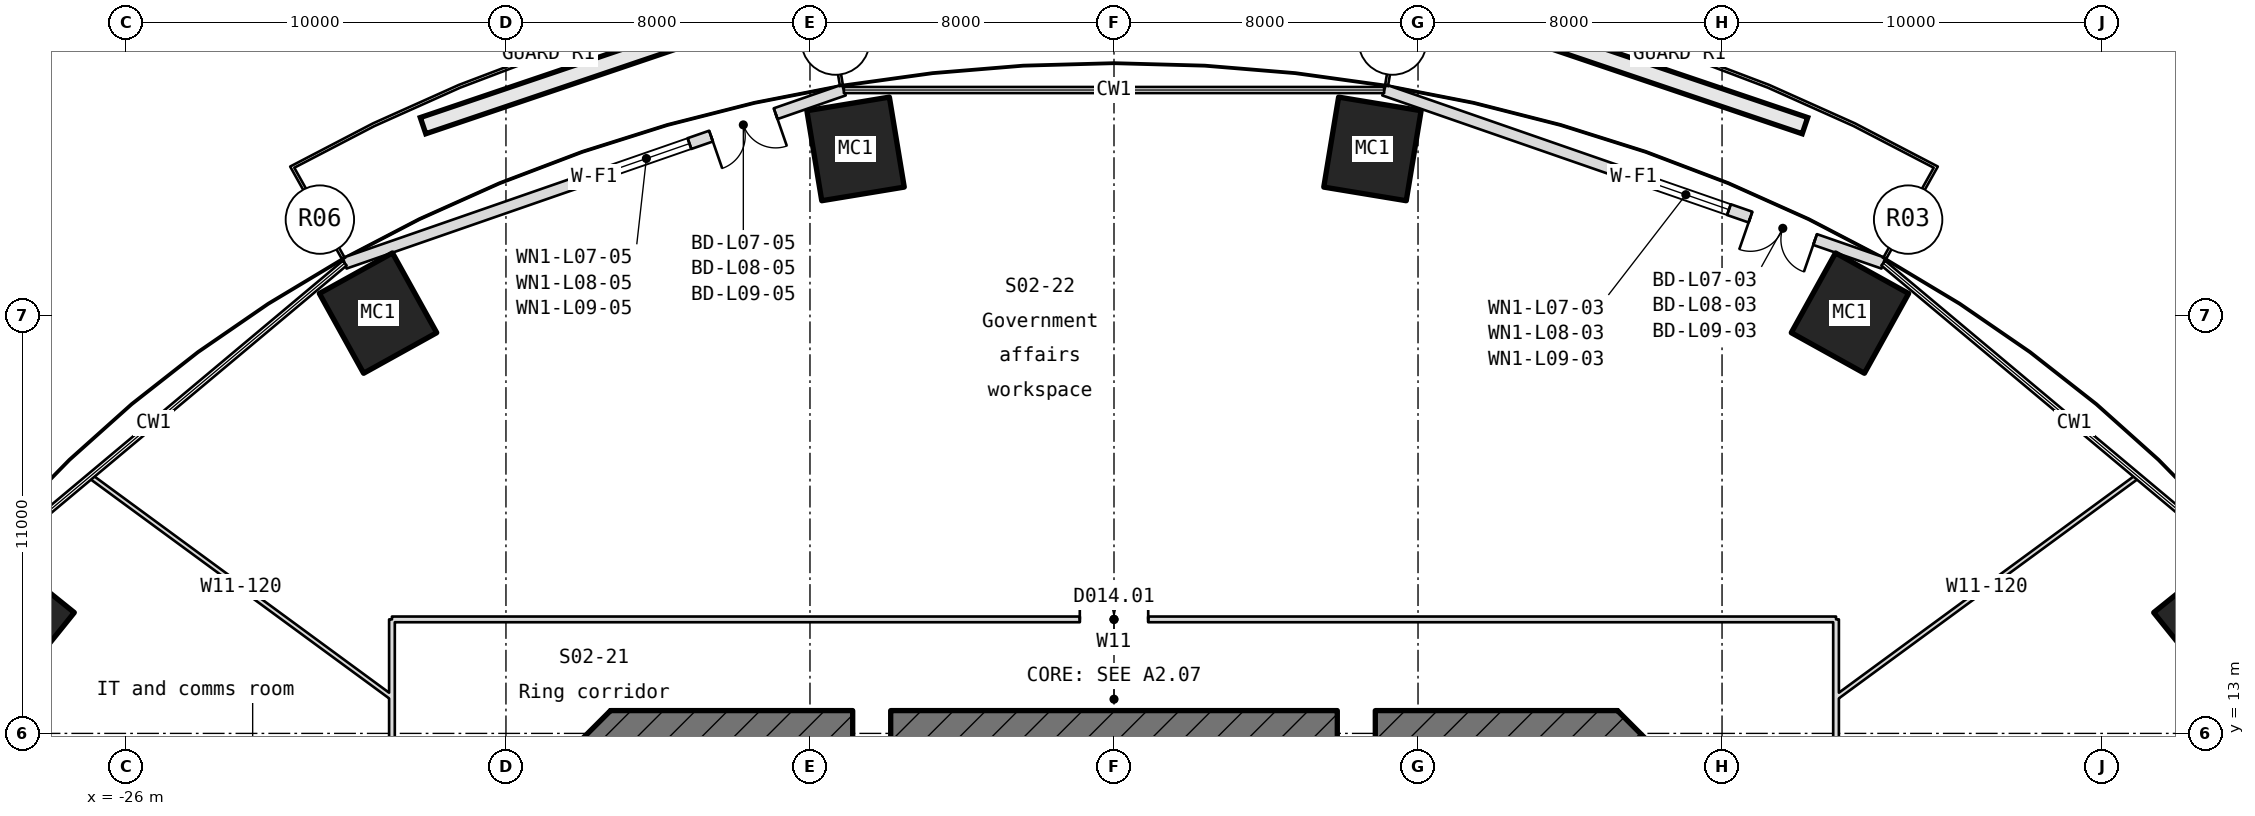
"""IFC4 building model, lengths in metres.
Left out: names, types, materials, properties, quantities, classifications, styles, units other than length and angle.
Written with IfcOpenShell. Run it as: python <this file> out.ifc"""

import sys

from ifc_helpers import new_model, si_unit, direction, frame, frame_2d, origin, origin_2d, place, context, subcontext, project, spatial, rectangle, hollow_rectangle, extrude, element, fill, save


model = new_model("IFC4")
c1 = context("Model", 3, precision=1e-05, world=origin(), true_north=direction((0.0, 1.0)))
c2 = subcontext(c1, "Body", "Model", "MODEL_VIEW")
j1 = project(units=[si_unit("LENGTHUNIT", "METRE"), si_unit("PLANEANGLEUNIT", "RADIAN")], contexts=[c1])
p1 = place(None, origin())
s1 = spatial("IfcSite", under=j1, at=p1, CompositionType="ELEMENT")
p2 = place(p1, origin())
s2 = spatial("IfcBuilding", under=s1, at=p2, CompositionType="ELEMENT")
p3 = place(p2, frame((0.0, 0.0, 45.45)))
s3 = spatial("IfcBuildingStorey", under=s2, at=p3, CompositionType="ELEMENT", Elevation=45.45)
for number, where, z_axis, x_axis in (
    (1, (28.983, 16.075, -0.18), (0.0, 0.0, 1.0), (0.627, -0.779, 0.0)),
    (2, (19.366, 24.059, -0.18), (0.0, 0.0, 1.0), (0.874, -0.485, 0.0)),
    (3, (6.801, 28.379, -0.18), (0.0, 0.0, 1.0), (0.987, -0.163, 0.0)),
    (4, (-6.801, 28.379, -0.18), (0.0, 0.0, 1.0), (0.987, 0.163, 0.0)),
    (5, (-19.366, 24.059, -0.18), (0.0, 0.0, 1.0), (0.874, 0.485, 0.0)),
    (6, (-28.983, 16.075, -0.18), (0.0, 0.0, 1.0), (0.627, 0.779, 0.0)),
):
    element("IfcColumn", number, at=place(p3, frame(where, z_axis=z_axis, x_axis=x_axis)), inside=s3, PredefinedType="COLUMN", context=c2, shape_type="SweptSolid", body=[
        extrude(hollow_rectangle(XDim=2.2, YDim=2.4, WallThickness=0.09, at=origin_2d()), origin(), (0.0, 0.0, 1.0), 4.15),
    ])
p4 = place(p3, frame((20.244, 25.372, 0.0), z_axis=(0.0, 0.0, 1.0), x_axis=(-0.944772924092, 0.327725680873, 0.0)))
e7 = element("IfcWall", 7, at=p4, inside=s3, PredefinedType="SOLIDWALL", context=c2, shape_type="SweptSolid", body=[
    extrude(rectangle(XDim=13.903, YDim=0.3, at=frame_2d((6.952, 0.0))), origin(), (0.0, 0.0, 1.0), 3.97),
])
p5 = place(p4, frame((1.9, 0.0, 0.0)))
e8 = element("IfcOpeningElement", 8, at=p5, cuts=e7, PredefinedType="OPENING", context=c2, shape_type="SweptSolid", body=[
    extrude(rectangle(XDim=1.8, YDim=2.4, at=frame_2d((0.9, 1.2))), frame((0.0, 0.16, 0.0), z_axis=(0.0, -1.0, 0.0), x_axis=(1.0, 0.0, 0.0)), (0.0, 0.0, 1.0), 0.32),
])
p6 = place(p4, frame((4.3, 0.0, 0.9)))
e9 = element("IfcOpeningElement", 9, at=p6, cuts=e7, PredefinedType="OPENING", context=c2, shape_type="SweptSolid", body=[
    extrude(rectangle(XDim=2.4, YDim=1.5, at=frame_2d((1.2, 0.75))), frame((0.0, 0.16, 0.0), z_axis=(0.0, -1.0, 0.0), x_axis=(1.0, 0.0, 0.0)), (0.0, 0.0, 1.0), 0.32),
])
p7 = place(p3, frame((-7.109, 29.929, 0.0), z_axis=(0.0, 0.0, 1.0), x_axis=(-0.944772924092, -0.327725680873, 0.0)))
e10 = element("IfcWall", 10, at=p7, inside=s3, PredefinedType="SOLIDWALL", context=c2, shape_type="SweptSolid", body=[
    extrude(rectangle(XDim=13.903, YDim=0.3, at=frame_2d((6.952, 0.0))), origin(), (0.0, 0.0, 1.0), 3.97),
])
p8 = place(p7, frame((1.9, 0.0, 0.0)))
e11 = element("IfcOpeningElement", 11, at=p8, cuts=e10, PredefinedType="OPENING", context=c2, shape_type="SweptSolid", body=[
    extrude(rectangle(XDim=1.8, YDim=2.4, at=frame_2d((0.9, 1.2))), frame((0.0, 0.16, 0.0), z_axis=(0.0, -1.0, 0.0), x_axis=(1.0, 0.0, 0.0)), (0.0, 0.0, 1.0), 0.32),
])
p9 = place(p7, frame((4.3, 0.0, 0.9)))
e12 = element("IfcOpeningElement", 12, at=p9, cuts=e10, PredefinedType="OPENING", context=c2, shape_type="SweptSolid", body=[
    extrude(rectangle(XDim=2.4, YDim=1.5, at=frame_2d((1.2, 0.75))), frame((0.0, 0.16, 0.0), z_axis=(0.0, -1.0, 0.0), x_axis=(1.0, 0.0, 0.0)), (0.0, 0.0, 1.0), 0.32),
])
p10 = place(p3, frame((16.176, 9.824, -0.18), z_axis=(0.0, 0.0, 1.0), x_axis=(-0.707106781187, 0.707106781187, 0.0)))
e13 = element("IfcWall", 13, at=p10, inside=s3, PredefinedType="SHEAR", context=c2, shape_type="SweptSolid", body=[
    extrude(rectangle(XDim=4.74, YDim=1.2, at=frame_2d((2.37, 0.0))), origin(), (0.0, 0.0, 1.0), 4.15),
])
p11 = place(p3, frame((13.249, 13.0, -0.18), z_axis=(0.0, 0.0, 1.0), x_axis=(-1.0, 0.0, 0.0)))
e14 = element("IfcWall", 14, at=p11, inside=s3, PredefinedType="SHEAR", context=c2, shape_type="SweptSolid", body=[
    extrude(rectangle(XDim=26.497, YDim=1.2, at=frame_2d((13.249, 0.0))), origin(), (0.0, 0.0, 1.0), 4.15),
])
p12 = place(p11, frame((19.125, 0.0, 0.18)))
e15 = element("IfcOpeningElement", 15, at=p12, cuts=e14, PredefinedType="OPENING", context=c2, shape_type="SweptSolid", body=[
    extrude(rectangle(XDim=1.0, YDim=2.1, at=frame_2d((0.5, 1.05))), frame((0.0, 0.61, 0.0), z_axis=(0.0, -1.0, 0.0), x_axis=(1.0, 0.0, 0.0)), (0.0, 0.0, 1.0), 1.22),
])
p13 = place(p11, frame((6.373, 0.0, 0.18)))
e16 = element("IfcOpeningElement", 16, at=p13, cuts=e14, PredefinedType="OPENING", context=c2, shape_type="SweptSolid", body=[
    extrude(rectangle(XDim=1.0, YDim=2.1, at=frame_2d((0.5, 1.05))), frame((0.0, 0.61, 0.0), z_axis=(0.0, -1.0, 0.0), x_axis=(1.0, 0.0, 0.0)), (0.0, 0.0, 1.0), 1.22),
])
p14 = place(p3, frame((-12.824, 13.176, -0.18), z_axis=(0.0, 0.0, 1.0), x_axis=(-0.707106781187, -0.707106781187, 0.0)))
e17 = element("IfcWall", 17, at=p14, inside=s3, PredefinedType="SHEAR", context=c2, shape_type="SweptSolid", body=[
    extrude(rectangle(XDim=4.74, YDim=1.2, at=frame_2d((2.37, 0.0))), origin(), (0.0, 0.0, 1.0), 4.15),
])
p15 = place(p3, frame((-19.0, -16.0, 0.0), z_axis=(0.0, 0.0, 1.0), x_axis=(0.0, 1.0, 0.0)))
e18 = element("IfcWall", 18, at=p15, inside=s3, PredefinedType="PARTITIONING", context=c2, shape_type="SweptSolid", body=[
    extrude(rectangle(XDim=32.0, YDim=0.15, at=frame_2d((16.0, 0.0))), origin(), (0.0, 0.0, 1.0), 3.97),
])
p16 = place(p15, frame((23.947, 0.0, 0.0)))
e19 = element("IfcOpeningElement", 19, at=p16, cuts=e18, PredefinedType="OPENING", context=c2, shape_type="SweptSolid", body=[
    extrude(rectangle(XDim=0.95, YDim=2.1, at=frame_2d((0.475, 1.05))), frame((0.0, 0.085, 0.0), z_axis=(0.0, -1.0, 0.0), x_axis=(1.0, 0.0, 0.0)), (0.0, 0.0, 1.0), 0.17),
])
p17 = place(p15, frame((19.771, 0.0, 0.0)))
e20 = element("IfcOpeningElement", 20, at=p17, cuts=e18, PredefinedType="OPENING", context=c2, shape_type="SweptSolid", body=[
    extrude(rectangle(XDim=0.95, YDim=2.1, at=frame_2d((0.475, 1.05))), frame((0.0, 0.085, 0.0), z_axis=(0.0, -1.0, 0.0), x_axis=(1.0, 0.0, 0.0)), (0.0, 0.0, 1.0), 0.17),
])
p18 = place(p15, frame((15.804, 0.0, 0.0)))
e21 = element("IfcOpeningElement", 21, at=p18, cuts=e18, PredefinedType="OPENING", context=c2, shape_type="SweptSolid", body=[
    extrude(rectangle(XDim=0.95, YDim=2.1, at=frame_2d((0.475, 1.05))), frame((0.0, 0.085, 0.0), z_axis=(0.0, -1.0, 0.0), x_axis=(1.0, 0.0, 0.0)), (0.0, 0.0, 1.0), 0.17),
])
p19 = place(p15, frame((12.03, 0.0, 0.0)))
e22 = element("IfcOpeningElement", 22, at=p19, cuts=e18, PredefinedType="OPENING", context=c2, shape_type="SweptSolid", body=[
    extrude(rectangle(XDim=0.95, YDim=2.1, at=frame_2d((0.475, 1.05))), frame((0.0, 0.085, 0.0), z_axis=(0.0, -1.0, 0.0), x_axis=(1.0, 0.0, 0.0)), (0.0, 0.0, 1.0), 0.17),
])
p20 = place(p3, frame((-19.0, 13.941, 0.0), z_axis=(0.0, 0.0, 1.0), x_axis=(-0.806231534746, 0.591600128787, 0.0)))
e23 = element("IfcWall", 23, at=p20, inside=s3, PredefinedType="PARTITIONING", context=c2, shape_type="SweptSolid", body=[
    extrude(rectangle(XDim=9.846, YDim=0.12, at=frame_2d((4.923, 0.0))), origin(), (0.0, 0.0, 1.0), 3.97),
])
p21 = place(p3, frame((-19.0, 16.0, 0.0), z_axis=(0.0, 0.0, 1.0), x_axis=(1.0, 0.0, 0.0)))
e24 = element("IfcWall", 24, at=p21, inside=s3, PredefinedType="PARTITIONING", context=c2, shape_type="SweptSolid", body=[
    extrude(rectangle(XDim=38.0, YDim=0.15, at=frame_2d((19.0, 0.0))), origin(), (0.0, 0.0, 1.0), 3.97),
])
p22 = place(p21, frame((18.1, 0.0, 0.0)))
e25 = element("IfcOpeningElement", 25, at=p22, cuts=e24, PredefinedType="OPENING", context=c2, shape_type="SweptSolid", body=[
    extrude(rectangle(XDim=1.8, YDim=2.1, at=frame_2d((0.9, 1.05))), frame((0.0, 0.085, 0.0), z_axis=(0.0, -1.0, 0.0), x_axis=(1.0, 0.0, 0.0)), (0.0, 0.0, 1.0), 0.17),
])
p23 = place(p3, frame((19.0, 13.941, 0.0), z_axis=(0.0, 0.0, 1.0), x_axis=(0.806243361472, 0.59158401101, 0.0)))
e26 = element("IfcWall", 26, at=p23, inside=s3, PredefinedType="PARTITIONING", context=c2, shape_type="SweptSolid", body=[
    extrude(rectangle(XDim=9.846, YDim=0.12, at=frame_2d((4.923, 0.0))), origin(), (0.0, 0.0, 1.0), 3.97),
])
p24 = place(p3, frame((19.0, 16.0, 0.0), z_axis=(0.0, 0.0, 1.0), x_axis=(0.0, -1.0, 0.0)))
e27 = element("IfcWall", 27, at=p24, inside=s3, PredefinedType="PARTITIONING", context=c2, shape_type="SweptSolid", body=[
    extrude(rectangle(XDim=32.0, YDim=0.15, at=frame_2d((16.0, 0.0))), origin(), (0.0, 0.0, 1.0), 3.97),
])
p25 = place(p24, frame((25.966, 0.0, 0.0)))
e28 = element("IfcOpeningElement", 28, at=p25, cuts=e27, PredefinedType="OPENING", context=c2, shape_type="SweptSolid", body=[
    extrude(rectangle(XDim=0.95, YDim=2.1, at=frame_2d((0.475, 1.05))), frame((0.0, 0.085, 0.0), z_axis=(0.0, -1.0, 0.0), x_axis=(1.0, 0.0, 0.0)), (0.0, 0.0, 1.0), 0.17),
])
p26 = place(p24, frame((18.964, 0.0, 0.0)))
e29 = element("IfcOpeningElement", 29, at=p26, cuts=e27, PredefinedType="OPENING", context=c2, shape_type="SweptSolid", body=[
    extrude(rectangle(XDim=0.95, YDim=2.1, at=frame_2d((0.475, 1.05))), frame((0.0, 0.085, 0.0), z_axis=(0.0, -1.0, 0.0), x_axis=(1.0, 0.0, 0.0)), (0.0, 0.0, 1.0), 0.17),
])
p27 = place(p24, frame((8.098, 0.0, 0.0)))
e30 = element("IfcOpeningElement", 30, at=p27, cuts=e27, PredefinedType="OPENING", context=c2, shape_type="SweptSolid", body=[
    extrude(rectangle(XDim=1.8, YDim=2.1, at=frame_2d((0.9, 1.05))), frame((0.0, 0.085, 0.0), z_axis=(0.0, -1.0, 0.0), x_axis=(1.0, 0.0, 0.0)), (0.0, 0.0, 1.0), 0.17),
])
p28 = place(p5, origin())
e31 = element("IfcDoor", 31, at=p28, inside=s3, OperationType="SINGLE_SWING_LEFT", PredefinedType="DOOR", context=c2, shape_type="SweptSolid", body=[
    extrude(rectangle(XDim=1.8, YDim=2.4, at=frame_2d((0.9, 1.2))), frame((0.0, 0.025, 0.0), z_axis=(0.0, -1.0, 0.0), x_axis=(1.0, 0.0, 0.0)), (0.0, 0.0, 1.0), 0.05),
])
fill(e8, e31)
p29 = place(p6, origin())
e32 = element("IfcWindow", 32, at=p29, inside=s3, PartitioningType="SINGLE_PANEL", PredefinedType="WINDOW", context=c2, shape_type="SweptSolid", body=[
    extrude(rectangle(XDim=2.4, YDim=1.5, at=frame_2d((1.2, 0.75))), frame((0.0, 0.03, 0.0), z_axis=(0.0, -1.0, 0.0), x_axis=(1.0, 0.0, 0.0)), (0.0, 0.0, 1.0), 0.06),
])
fill(e9, e32)
p30 = place(p8, origin())
e33 = element("IfcDoor", 33, at=p30, inside=s3, OperationType="SINGLE_SWING_LEFT", PredefinedType="DOOR", context=c2, shape_type="SweptSolid", body=[
    extrude(rectangle(XDim=1.8, YDim=2.4, at=frame_2d((0.9, 1.2))), frame((0.0, 0.025, 0.0), z_axis=(0.0, -1.0, 0.0), x_axis=(1.0, 0.0, 0.0)), (0.0, 0.0, 1.0), 0.05),
])
fill(e11, e33)
p31 = place(p9, origin())
e34 = element("IfcWindow", 34, at=p31, inside=s3, PartitioningType="SINGLE_PANEL", PredefinedType="WINDOW", context=c2, shape_type="SweptSolid", body=[
    extrude(rectangle(XDim=2.4, YDim=1.5, at=frame_2d((1.2, 0.75))), frame((0.0, 0.03, 0.0), z_axis=(0.0, -1.0, 0.0), x_axis=(1.0, 0.0, 0.0)), (0.0, 0.0, 1.0), 0.06),
])
fill(e12, e34)
p32 = place(p12, origin())
e35 = element("IfcDoor", 35, at=p32, inside=s3, OperationType="SINGLE_SWING_RIGHT", PredefinedType="DOOR", context=c2, shape_type="SweptSolid", body=[
    extrude(rectangle(XDim=1.0, YDim=2.1, at=frame_2d((0.5, 1.05))), frame((0.0, 0.025, 0.0), z_axis=(0.0, -1.0, 0.0), x_axis=(1.0, 0.0, 0.0)), (0.0, 0.0, 1.0), 0.05),
])
fill(e15, e35)
p33 = place(p13, origin())
e36 = element("IfcDoor", 36, at=p33, inside=s3, OperationType="SINGLE_SWING_RIGHT", PredefinedType="DOOR", context=c2, shape_type="SweptSolid", body=[
    extrude(rectangle(XDim=1.0, YDim=2.1, at=frame_2d((0.5, 1.05))), frame((0.0, 0.025, 0.0), z_axis=(0.0, -1.0, 0.0), x_axis=(1.0, 0.0, 0.0)), (0.0, 0.0, 1.0), 0.05),
])
fill(e16, e36)
p34 = place(p22, origin())
e37 = element("IfcDoor", 37, at=p34, inside=s3, OperationType="DOUBLE_DOOR_SINGLE_SWING", PredefinedType="DOOR", context=c2, shape_type="SweptSolid", body=[
    extrude(rectangle(XDim=1.8, YDim=2.1, at=frame_2d((0.9, 1.05))), frame((0.0, 0.025, 0.0), z_axis=(0.0, -1.0, 0.0), x_axis=(1.0, 0.0, 0.0)), (0.0, 0.0, 1.0), 0.05),
])
fill(e25, e37)
save(model, sys.argv[1])
